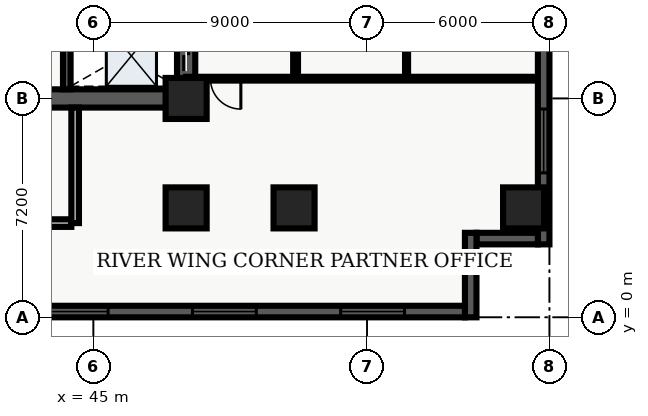
"""IFC4 building model, lengths in metres.
Left out: names, types, materials, properties, quantities, classifications, styles, units other than length and angle.
Written with IfcOpenShell. Run it as: python <this file> out.ifc"""

import sys

from ifc_helpers import new_model, entity, si_unit, converted_unit, direction, frame, origin_with_axes, origin_2d_with_axis, place, context, subcontext, project, spatial, polyline, rectangle, outline, extrude, element, fill, save


model = new_model("IFC4")
c1 = context("Model", 3, precision=1e-05, world=origin_with_axes(), true_north=direction((0.0, 1.0)))
c2 = subcontext(c1, "Body", "Model", "MODEL_VIEW")
j1 = project(units=[si_unit("LENGTHUNIT", "METRE"), converted_unit("PLANEANGLEUNIT", "DEGREE", entity("IfcPlaneAngleMeasure", 0.017), si_unit("PLANEANGLEUNIT", "RADIAN"), dimensions=[0, 0, 0, 0, 0, 0, 0])], contexts=[c1])
p1 = place(None, origin_with_axes())
s1 = spatial("IfcSite", under=j1, at=p1, CompositionType="ELEMENT")
p2 = place(p1, origin_with_axes())
s2 = spatial("IfcBuilding", under=s1, at=p2, CompositionType="ELEMENT")
p3 = place(p2, frame((0.0, 0.0, 40.5), z_axis=(0.0, 0.0, 1.0), x_axis=(1.0, 0.0, 0.0)))
s3 = spatial("IfcBuildingStorey", under=s2, at=p3, CompositionType="ELEMENT", Elevation=40.5)
p4 = place(p3, frame((40.2, 7.2, 0.0), z_axis=(0.0, 0.0, 1.0), x_axis=(1.0, 0.0, 0.0)))
e1 = element("IfcWall", 1, at=p4, inside=s3, PredefinedType="SHEAR", context=c2, shape_type="SweptSolid", body=[
    extrude(outline(polyline([(0.0, -0.3), (7.85, -0.3), (7.85, 0.3), (0.0, 0.3), (0.0, -0.3)])), origin_with_axes(), (0.0, 0.0, 1.0), 3.66),
])
p5 = place(p4, frame((2.175, 0.0, 0.0), z_axis=(0.0, 0.0, 1.0), x_axis=(1.0, 0.0, 0.0)))
e2 = element("IfcOpeningElement", 2, at=p5, cuts=e1, PredefinedType="OPENING", context=c2, shape_type="SweptSolid", body=[
    extrude(rectangle(XDim=1.05, YDim=0.62, at=origin_2d_with_axis()), origin_with_axes(), (0.0, 0.0, 1.0), 2.15),
])
p6 = place(p3, frame((48.05, 7.2, 0.0), z_axis=(0.0, 0.0, 1.0), x_axis=(0.0, 1.0, 0.0)))
e3 = element("IfcWall", 3, at=p6, inside=s3, PredefinedType="SHEAR", context=c2, shape_type="SweptSolid", body=[
    extrude(outline(polyline([(0.0, -0.3), (15.6, -0.3), (15.6, 0.3), (0.0, 0.3), (0.0, -0.3)])), origin_with_axes(), (0.0, 0.0, 1.0), 3.66),
])
p7 = place(p6, frame((1.425, 0.0, 0.0), z_axis=(0.0, 0.0, 1.0), x_axis=(1.0, 0.0, 0.0)))
e4 = element("IfcOpeningElement", 4, at=p7, cuts=e3, PredefinedType="OPENING", context=c2, shape_type="SweptSolid", body=[
    extrude(rectangle(XDim=1.05, YDim=0.62, at=origin_2d_with_axis()), origin_with_axes(), (0.0, 0.0, 1.0), 2.15),
])
p8 = place(p6, frame((3.475, 0.0, 0.0), z_axis=(0.0, 0.0, 1.0), x_axis=(1.0, 0.0, 0.0)))
e5 = element("IfcOpeningElement", 5, at=p8, cuts=e3, PredefinedType="OPENING", context=c2, shape_type="SweptSolid", body=[
    extrude(rectangle(XDim=1.05, YDim=0.62, at=origin_2d_with_axis()), origin_with_axes(), (0.0, 0.0, 1.0), 2.15),
])
p9 = place(p6, frame((5.625, 0.0, 0.0), z_axis=(0.0, 0.0, 1.0), x_axis=(1.0, 0.0, 0.0)))
e6 = element("IfcOpeningElement", 6, at=p9, cuts=e3, PredefinedType="OPENING", context=c2, shape_type="SweptSolid", body=[
    extrude(rectangle(XDim=0.95, YDim=0.62, at=origin_2d_with_axis()), origin_with_axes(), (0.0, 0.0, 1.0), 2.15),
])
p10 = place(p3, frame((44.125, 7.5, 0.0), z_axis=(0.0, 0.0, 1.0), x_axis=(0.0, 1.0, 0.0)))
e7 = element("IfcWall", 7, at=p10, inside=s3, PredefinedType="SHEAR", context=c2, shape_type="SweptSolid", body=[
    extrude(outline(polyline([(0.0, -0.125), (15.0, -0.125), (15.0, 0.125), (0.0, 0.125), (0.0, -0.125)])), origin_with_axes(), (0.0, 0.0, 1.0), 3.66),
])
p11 = place(p3, frame((40.325, 3.1, 0.0), z_axis=(0.0, 0.0, 1.0), x_axis=(1.0, 0.0, 0.0)))
e8 = element("IfcWall", 8, at=p11, inside=s3, PredefinedType="SOLIDWALL", context=c2, shape_type="SweptSolid", body=[
    extrude(outline(polyline([(0.0, -0.125), (3.95, -0.125), (3.95, 0.125), (0.0, 0.125), (0.0, -0.125)])), origin_with_axes(), (0.0, 0.0, 1.0), 2.7),
])
p12 = place(p3, frame((44.4, 3.1, 0.0), z_axis=(0.0, 0.0, 1.0), x_axis=(0.0, 1.0, 0.0)))
e9 = element("IfcWall", 9, at=p12, inside=s3, PredefinedType="SOLIDWALL", context=c2, shape_type="SweptSolid", body=[
    extrude(outline(polyline([(0.0, -0.125), (3.8, -0.125), (3.8, 0.125), (0.0, 0.125), (0.0, -0.125)])), origin_with_axes(), (0.0, 0.0, 1.0), 2.7),
])
for number, where, z_axis, x_axis in (
    (10, (48.05, 3.6, 0.0), (0.0, 0.0, 1.0), (1.0, 0.0, 0.0)),
    (11, (48.05, 7.2, 0.0), (0.0, 0.0, 1.0), (1.0, 0.0, 0.0)),
    (12, (51.6, 3.6, 0.0), (0.0, 0.0, 1.0), (1.0, 0.0, 0.0)),
    (13, (59.15, 3.6, 0.0), (0.0, 0.0, 1.0), (1.0, 0.0, 0.0)),
):
    element("IfcColumn", number, at=place(p3, frame(where, z_axis=z_axis, x_axis=x_axis)), inside=s3, PredefinedType="COLUMN", context=c2, shape_type="SweptSolid", body=[
        extrude(rectangle(XDim=1.35, YDim=1.35, at=origin_2d_with_axis()), origin_with_axes(), (0.0, 0.0, 1.0), 3.9),
    ])
p13 = place(p3, frame((51.65, 7.85, 0.0), z_axis=(0.0, 0.0, 1.0), x_axis=(0.0, 1.0, 0.0)))
e14 = element("IfcWall", 14, at=p13, inside=s3, PredefinedType="PARTITIONING", context=c2, shape_type="SweptSolid", body=[
    extrude(outline(polyline([(0.0, -0.08), (18.8, -0.08), (18.8, 0.08), (0.0, 0.08), (0.0, -0.08)])), origin_with_axes(), (0.0, 0.0, 1.0), 2.7),
])
p14 = place(p13, frame((4.453, 0.0, 0.0), z_axis=(0.0, 0.0, 1.0), x_axis=(1.0, 0.0, 0.0)))
e15 = element("IfcOpeningElement", 15, at=p14, cuts=e14, PredefinedType="OPENING", context=c2, shape_type="SweptSolid", body=[
    extrude(rectangle(XDim=1.0, YDim=0.18, at=origin_2d_with_axis()), origin_with_axes(), (0.0, 0.0, 1.0), 2.15),
])
p15 = place(p13, frame((7.831, 0.0, 0.0), z_axis=(0.0, 0.0, 1.0), x_axis=(1.0, 0.0, 0.0)))
e16 = element("IfcOpeningElement", 16, at=p15, cuts=e14, PredefinedType="OPENING", context=c2, shape_type="SweptSolid", body=[
    extrude(rectangle(XDim=1.0, YDim=0.18, at=origin_2d_with_axis()), origin_with_axes(), (0.0, 0.0, 1.0), 2.15),
])
p16 = place(p13, frame((11.898, 0.0, 0.0), z_axis=(0.0, 0.0, 1.0), x_axis=(1.0, 0.0, 0.0)))
e17 = element("IfcOpeningElement", 17, at=p16, cuts=e14, PredefinedType="OPENING", context=c2, shape_type="SweptSolid", body=[
    extrude(rectangle(XDim=1.0, YDim=0.18, at=origin_2d_with_axis()), origin_with_axes(), (0.0, 0.0, 1.0), 2.15),
])
p17 = place(p13, frame((17.98, 0.0, 0.0), z_axis=(0.0, 0.0, 1.0), x_axis=(1.0, 0.0, 0.0)))
e18 = element("IfcOpeningElement", 18, at=p17, cuts=e14, PredefinedType="OPENING", context=c2, shape_type="SweptSolid", body=[
    extrude(rectangle(XDim=1.0, YDim=0.18, at=origin_2d_with_axis()), origin_with_axes(), (0.0, 0.0, 1.0), 2.15),
])
p18 = place(p3, frame((59.64, 7.85, 0.0), z_axis=(0.0, 0.0, 1.0), x_axis=(-1.0, 0.0, 0.0)))
e19 = element("IfcWall", 19, at=p18, inside=s3, PredefinedType="PARTITIONING", context=c2, shape_type="SweptSolid", body=[
    extrude(outline(polyline([(0.0, -0.062), (11.59, -0.062), (11.59, 0.062), (0.0, 0.062), (0.0, -0.062)])), origin_with_axes(), (0.0, 0.0, 1.0), 2.7),
])
p19 = place(p18, frame((10.29, 0.0, 0.0), z_axis=(0.0, 0.0, 1.0), x_axis=(1.0, 0.0, 0.0)))
e20 = element("IfcOpeningElement", 20, at=p19, cuts=e19, PredefinedType="OPENING", context=c2, shape_type="SweptSolid", body=[
    extrude(rectangle(XDim=1.0, YDim=0.145, at=origin_2d_with_axis()), origin_with_axes(), (0.0, 0.0, 1.0), 2.15),
])
p20 = place(p3, frame((55.3, 7.98, 0.0), z_axis=(0.0, 0.0, 1.0), x_axis=(0.0, 1.0, 0.0)))
e21 = element("IfcWall", 21, at=p20, inside=s3, PredefinedType="PARTITIONING", context=c2, shape_type="SweptSolid", body=[
    extrude(outline(polyline([(0.0, -0.05), (18.54, -0.05), (18.54, 0.05), (0.0, 0.05), (0.0, -0.05)])), origin_with_axes(), (0.0, 0.0, 1.0), 2.7),
])
p21 = place(p20, frame((3.073, 0.0, 0.0), z_axis=(0.0, 0.0, 1.0), x_axis=(1.0, 0.0, 0.0)))
e22 = element("IfcOpeningElement", 22, at=p21, cuts=e21, PredefinedType="OPENING", context=c2, shape_type="SweptSolid", body=[
    extrude(rectangle(XDim=0.95, YDim=0.12, at=origin_2d_with_axis()), origin_with_axes(), (0.0, 0.0, 1.0), 2.15),
])
p22 = place(p20, frame((7.981, 0.0, 0.0), z_axis=(0.0, 0.0, 1.0), x_axis=(1.0, 0.0, 0.0)))
e23 = element("IfcOpeningElement", 23, at=p22, cuts=e21, PredefinedType="OPENING", context=c2, shape_type="SweptSolid", body=[
    extrude(rectangle(XDim=0.95, YDim=0.12, at=origin_2d_with_axis()), origin_with_axes(), (0.0, 0.0, 1.0), 2.15),
])
p23 = place(p20, frame((11.768, 0.0, 0.0), z_axis=(0.0, 0.0, 1.0), x_axis=(1.0, 0.0, 0.0)))
e24 = element("IfcOpeningElement", 24, at=p23, cuts=e21, PredefinedType="OPENING", context=c2, shape_type="SweptSolid", body=[
    extrude(rectangle(XDim=0.95, YDim=0.12, at=origin_2d_with_axis()), origin_with_axes(), (0.0, 0.0, 1.0), 2.15),
])
p24 = place(p20, frame((16.201, 0.0, 0.0), z_axis=(0.0, 0.0, 1.0), x_axis=(1.0, 0.0, 0.0)))
e25 = element("IfcOpeningElement", 25, at=p24, cuts=e21, PredefinedType="OPENING", context=c2, shape_type="SweptSolid", body=[
    extrude(rectangle(XDim=0.95, YDim=0.12, at=origin_2d_with_axis()), origin_with_axes(), (0.0, 0.0, 1.0), 2.15),
])
p25 = place(p3, frame((59.81, 26.02, 0.0), z_axis=(0.0, 0.0, 1.0), x_axis=(0.0, -1.0, 0.0)))
e26 = element("IfcWall", 26, at=p25, inside=s3, PredefinedType="SOLIDWALL", context=c2, shape_type="SweptSolid", body=[
    extrude(outline(polyline([(0.0, -0.19), (23.62, -0.19), (23.62, 0.19), (0.0, 0.19), (0.0, -0.19)])), origin_with_axes(), (0.0, 0.0, 1.0), 3.66),
])
p26 = place(p25, frame((20.218, 0.0, 0.45), z_axis=(0.0, 0.0, 1.0), x_axis=(1.0, 0.0, 0.0)))
e27 = element("IfcOpeningElement", 27, at=p26, cuts=e26, PredefinedType="OPENING", context=c2, shape_type="SweptSolid", body=[
    extrude(rectangle(XDim=2.1, YDim=0.4, at=origin_2d_with_axis()), origin_with_axes(), (0.0, 0.0, 1.0), 2.2),
])
p27 = place(p3, frame((59.62, 2.59, 0.0), z_axis=(0.0, 0.0, 1.0), x_axis=(-1.0, 0.0, 0.0)))
e28 = element("IfcWall", 28, at=p27, inside=s3, PredefinedType="SOLIDWALL", context=c2, shape_type="SweptSolid", body=[
    extrude(outline(polyline([(0.0, -0.19), (2.02, -0.19), (2.02, 0.19), (0.0, 0.19), (0.0, -0.19)])), origin_with_axes(), (0.0, 0.0, 1.0), 3.66),
])
p28 = place(p3, frame((57.41, 2.78, 0.0), z_axis=(0.0, 0.0, 1.0), x_axis=(0.0, -1.0, 0.0)))
e29 = element("IfcWall", 29, at=p28, inside=s3, PredefinedType="SOLIDWALL", context=c2, shape_type="SweptSolid", body=[
    extrude(outline(polyline([(0.0, -0.19), (2.78, -0.19), (2.78, 0.19), (0.0, 0.19), (0.0, -0.19)])), origin_with_axes(), (0.0, 0.0, 1.0), 3.66),
])
p29 = place(p3, frame((57.22, 0.19, 0.0), z_axis=(0.0, 0.0, 1.0), x_axis=(-1.0, 0.0, 0.0)))
e30 = element("IfcWall", 30, at=p29, inside=s3, PredefinedType="SOLIDWALL", context=c2, shape_type="SweptSolid", body=[
    extrude(outline(polyline([(0.0, -0.19), (54.82, -0.19), (54.82, 0.19), (0.0, 0.19), (0.0, -0.19)])), origin_with_axes(), (0.0, 0.0, 1.0), 3.66),
])
p30 = place(p29, frame((3.037, 0.0, 0.45), z_axis=(0.0, 0.0, 1.0), x_axis=(1.0, 0.0, 0.0)))
e31 = element("IfcOpeningElement", 31, at=p30, cuts=e30, PredefinedType="OPENING", context=c2, shape_type="SweptSolid", body=[
    extrude(rectangle(XDim=2.1, YDim=0.4, at=origin_2d_with_axis()), origin_with_axes(), (0.0, 0.0, 1.0), 2.2),
])
p31 = place(p29, frame((7.912, 0.0, 0.45), z_axis=(0.0, 0.0, 1.0), x_axis=(1.0, 0.0, 0.0)))
e32 = element("IfcOpeningElement", 32, at=p31, cuts=e30, PredefinedType="OPENING", context=c2, shape_type="SweptSolid", body=[
    extrude(rectangle(XDim=2.1, YDim=0.4, at=origin_2d_with_axis()), origin_with_axes(), (0.0, 0.0, 1.0), 2.2),
])
p32 = place(p29, frame((12.786, 0.0, 0.45), z_axis=(0.0, 0.0, 1.0), x_axis=(1.0, 0.0, 0.0)))
e33 = element("IfcOpeningElement", 33, at=p32, cuts=e30, PredefinedType="OPENING", context=c2, shape_type="SweptSolid", body=[
    extrude(rectangle(XDim=2.1, YDim=0.4, at=origin_2d_with_axis()), origin_with_axes(), (0.0, 0.0, 1.0), 2.2),
])
p33 = place(p29, frame((17.661, 0.0, 0.45), z_axis=(0.0, 0.0, 1.0), x_axis=(1.0, 0.0, 0.0)))
e34 = element("IfcOpeningElement", 34, at=p33, cuts=e30, PredefinedType="OPENING", context=c2, shape_type="SweptSolid", body=[
    extrude(rectangle(XDim=2.1, YDim=0.4, at=origin_2d_with_axis()), origin_with_axes(), (0.0, 0.0, 1.0), 2.2),
])
p34 = place(p29, frame((22.535, 0.0, 0.45), z_axis=(0.0, 0.0, 1.0), x_axis=(1.0, 0.0, 0.0)))
e35 = element("IfcOpeningElement", 35, at=p34, cuts=e30, PredefinedType="OPENING", context=c2, shape_type="SweptSolid", body=[
    extrude(rectangle(XDim=2.1, YDim=0.4, at=origin_2d_with_axis()), origin_with_axes(), (0.0, 0.0, 1.0), 2.2),
])
p35 = place(p29, frame((27.41, 0.0, 0.45), z_axis=(0.0, 0.0, 1.0), x_axis=(1.0, 0.0, 0.0)))
e36 = element("IfcOpeningElement", 36, at=p35, cuts=e30, PredefinedType="OPENING", context=c2, shape_type="SweptSolid", body=[
    extrude(rectangle(XDim=2.1, YDim=0.4, at=origin_2d_with_axis()), origin_with_axes(), (0.0, 0.0, 1.0), 2.2),
])
p36 = place(p29, frame((32.285, 0.0, 0.45), z_axis=(0.0, 0.0, 1.0), x_axis=(1.0, 0.0, 0.0)))
e37 = element("IfcOpeningElement", 37, at=p36, cuts=e30, PredefinedType="OPENING", context=c2, shape_type="SweptSolid", body=[
    extrude(rectangle(XDim=2.1, YDim=0.4, at=origin_2d_with_axis()), origin_with_axes(), (0.0, 0.0, 1.0), 2.2),
])
p37 = place(p29, frame((37.159, 0.0, 0.45), z_axis=(0.0, 0.0, 1.0), x_axis=(1.0, 0.0, 0.0)))
e38 = element("IfcOpeningElement", 38, at=p37, cuts=e30, PredefinedType="OPENING", context=c2, shape_type="SweptSolid", body=[
    extrude(rectangle(XDim=2.1, YDim=0.4, at=origin_2d_with_axis()), origin_with_axes(), (0.0, 0.0, 1.0), 2.2),
])
p38 = place(p29, frame((41.584, 0.0, 0.45), z_axis=(0.0, 0.0, 1.0), x_axis=(1.0, 0.0, 0.0)))
e39 = element("IfcOpeningElement", 39, at=p38, cuts=e30, PredefinedType="OPENING", context=c2, shape_type="SweptSolid", body=[
    extrude(rectangle(XDim=2.1, YDim=0.4, at=origin_2d_with_axis()), origin_with_axes(), (0.0, 0.0, 1.0), 2.2),
])
p39 = place(p29, frame((46.908, 0.0, 0.45), z_axis=(0.0, 0.0, 1.0), x_axis=(1.0, 0.0, 0.0)))
e40 = element("IfcOpeningElement", 40, at=p39, cuts=e30, PredefinedType="OPENING", context=c2, shape_type="SweptSolid", body=[
    extrude(rectangle(XDim=2.1, YDim=0.4, at=origin_2d_with_axis()), origin_with_axes(), (0.0, 0.0, 1.0), 2.2),
])
p40 = place(p29, frame((51.783, 0.0, 0.45), z_axis=(0.0, 0.0, 1.0), x_axis=(1.0, 0.0, 0.0)))
e41 = element("IfcOpeningElement", 41, at=p40, cuts=e30, PredefinedType="OPENING", context=c2, shape_type="SweptSolid", body=[
    extrude(rectangle(XDim=2.1, YDim=0.4, at=origin_2d_with_axis()), origin_with_axes(), (0.0, 0.0, 1.0), 2.2),
])
p41 = place(p6, frame((1.425, 0.0, 0.0), z_axis=(0.0, 0.0, 1.0), x_axis=(1.0, 0.0, 0.0)))
e42 = element("IfcDoor", 42, at=p41, inside=s3, OperationType="SLIDING_TO_LEFT", PredefinedType="DOOR", context=c2, shape_type="SweptSolid", body=[
    extrude(rectangle(XDim=1.05, YDim=0.09, at=origin_2d_with_axis()), origin_with_axes(), (0.0, 0.0, 1.0), 2.15),
])
fill(e4, e42)
p42 = place(p18, frame((10.29, 0.0, 0.0), z_axis=(0.0, 0.0, 1.0), x_axis=(1.0, 0.0, 0.0)))
e43 = element("IfcDoor", 43, at=p42, inside=s3, OperationType="SINGLE_SWING_LEFT", PredefinedType="DOOR", context=c2, shape_type="SweptSolid", body=[
    extrude(rectangle(XDim=1.0, YDim=0.075, at=origin_2d_with_axis()), origin_with_axes(), (0.0, 0.0, 1.0), 2.15),
])
fill(e20, e43)
p43 = place(p25, frame((20.218, 0.0, 0.45), z_axis=(0.0, 0.0, 1.0), x_axis=(1.0, 0.0, 0.0)))
e44 = element("IfcWindow", 44, at=p43, inside=s3, PredefinedType="WINDOW", context=c2, shape_type="SweptSolid", body=[
    extrude(rectangle(XDim=2.1, YDim=0.09, at=origin_2d_with_axis()), origin_with_axes(), (0.0, 0.0, 1.0), 2.2),
])
fill(e27, e44)
p44 = place(p29, frame((3.037, 0.0, 0.45), z_axis=(0.0, 0.0, 1.0), x_axis=(1.0, 0.0, 0.0)))
e45 = element("IfcWindow", 45, at=p44, inside=s3, PredefinedType="WINDOW", context=c2, shape_type="SweptSolid", body=[
    extrude(rectangle(XDim=2.1, YDim=0.09, at=origin_2d_with_axis()), origin_with_axes(), (0.0, 0.0, 1.0), 2.2),
])
fill(e31, e45)
p45 = place(p29, frame((7.912, 0.0, 0.45), z_axis=(0.0, 0.0, 1.0), x_axis=(1.0, 0.0, 0.0)))
e46 = element("IfcWindow", 46, at=p45, inside=s3, PredefinedType="WINDOW", context=c2, shape_type="SweptSolid", body=[
    extrude(rectangle(XDim=2.1, YDim=0.09, at=origin_2d_with_axis()), origin_with_axes(), (0.0, 0.0, 1.0), 2.2),
])
fill(e32, e46)
p46 = place(p29, frame((12.786, 0.0, 0.45), z_axis=(0.0, 0.0, 1.0), x_axis=(1.0, 0.0, 0.0)))
e47 = element("IfcWindow", 47, at=p46, inside=s3, PredefinedType="WINDOW", context=c2, shape_type="SweptSolid", body=[
    extrude(rectangle(XDim=2.1, YDim=0.09, at=origin_2d_with_axis()), origin_with_axes(), (0.0, 0.0, 1.0), 2.2),
])
fill(e33, e47)
save(model, sys.argv[1])
